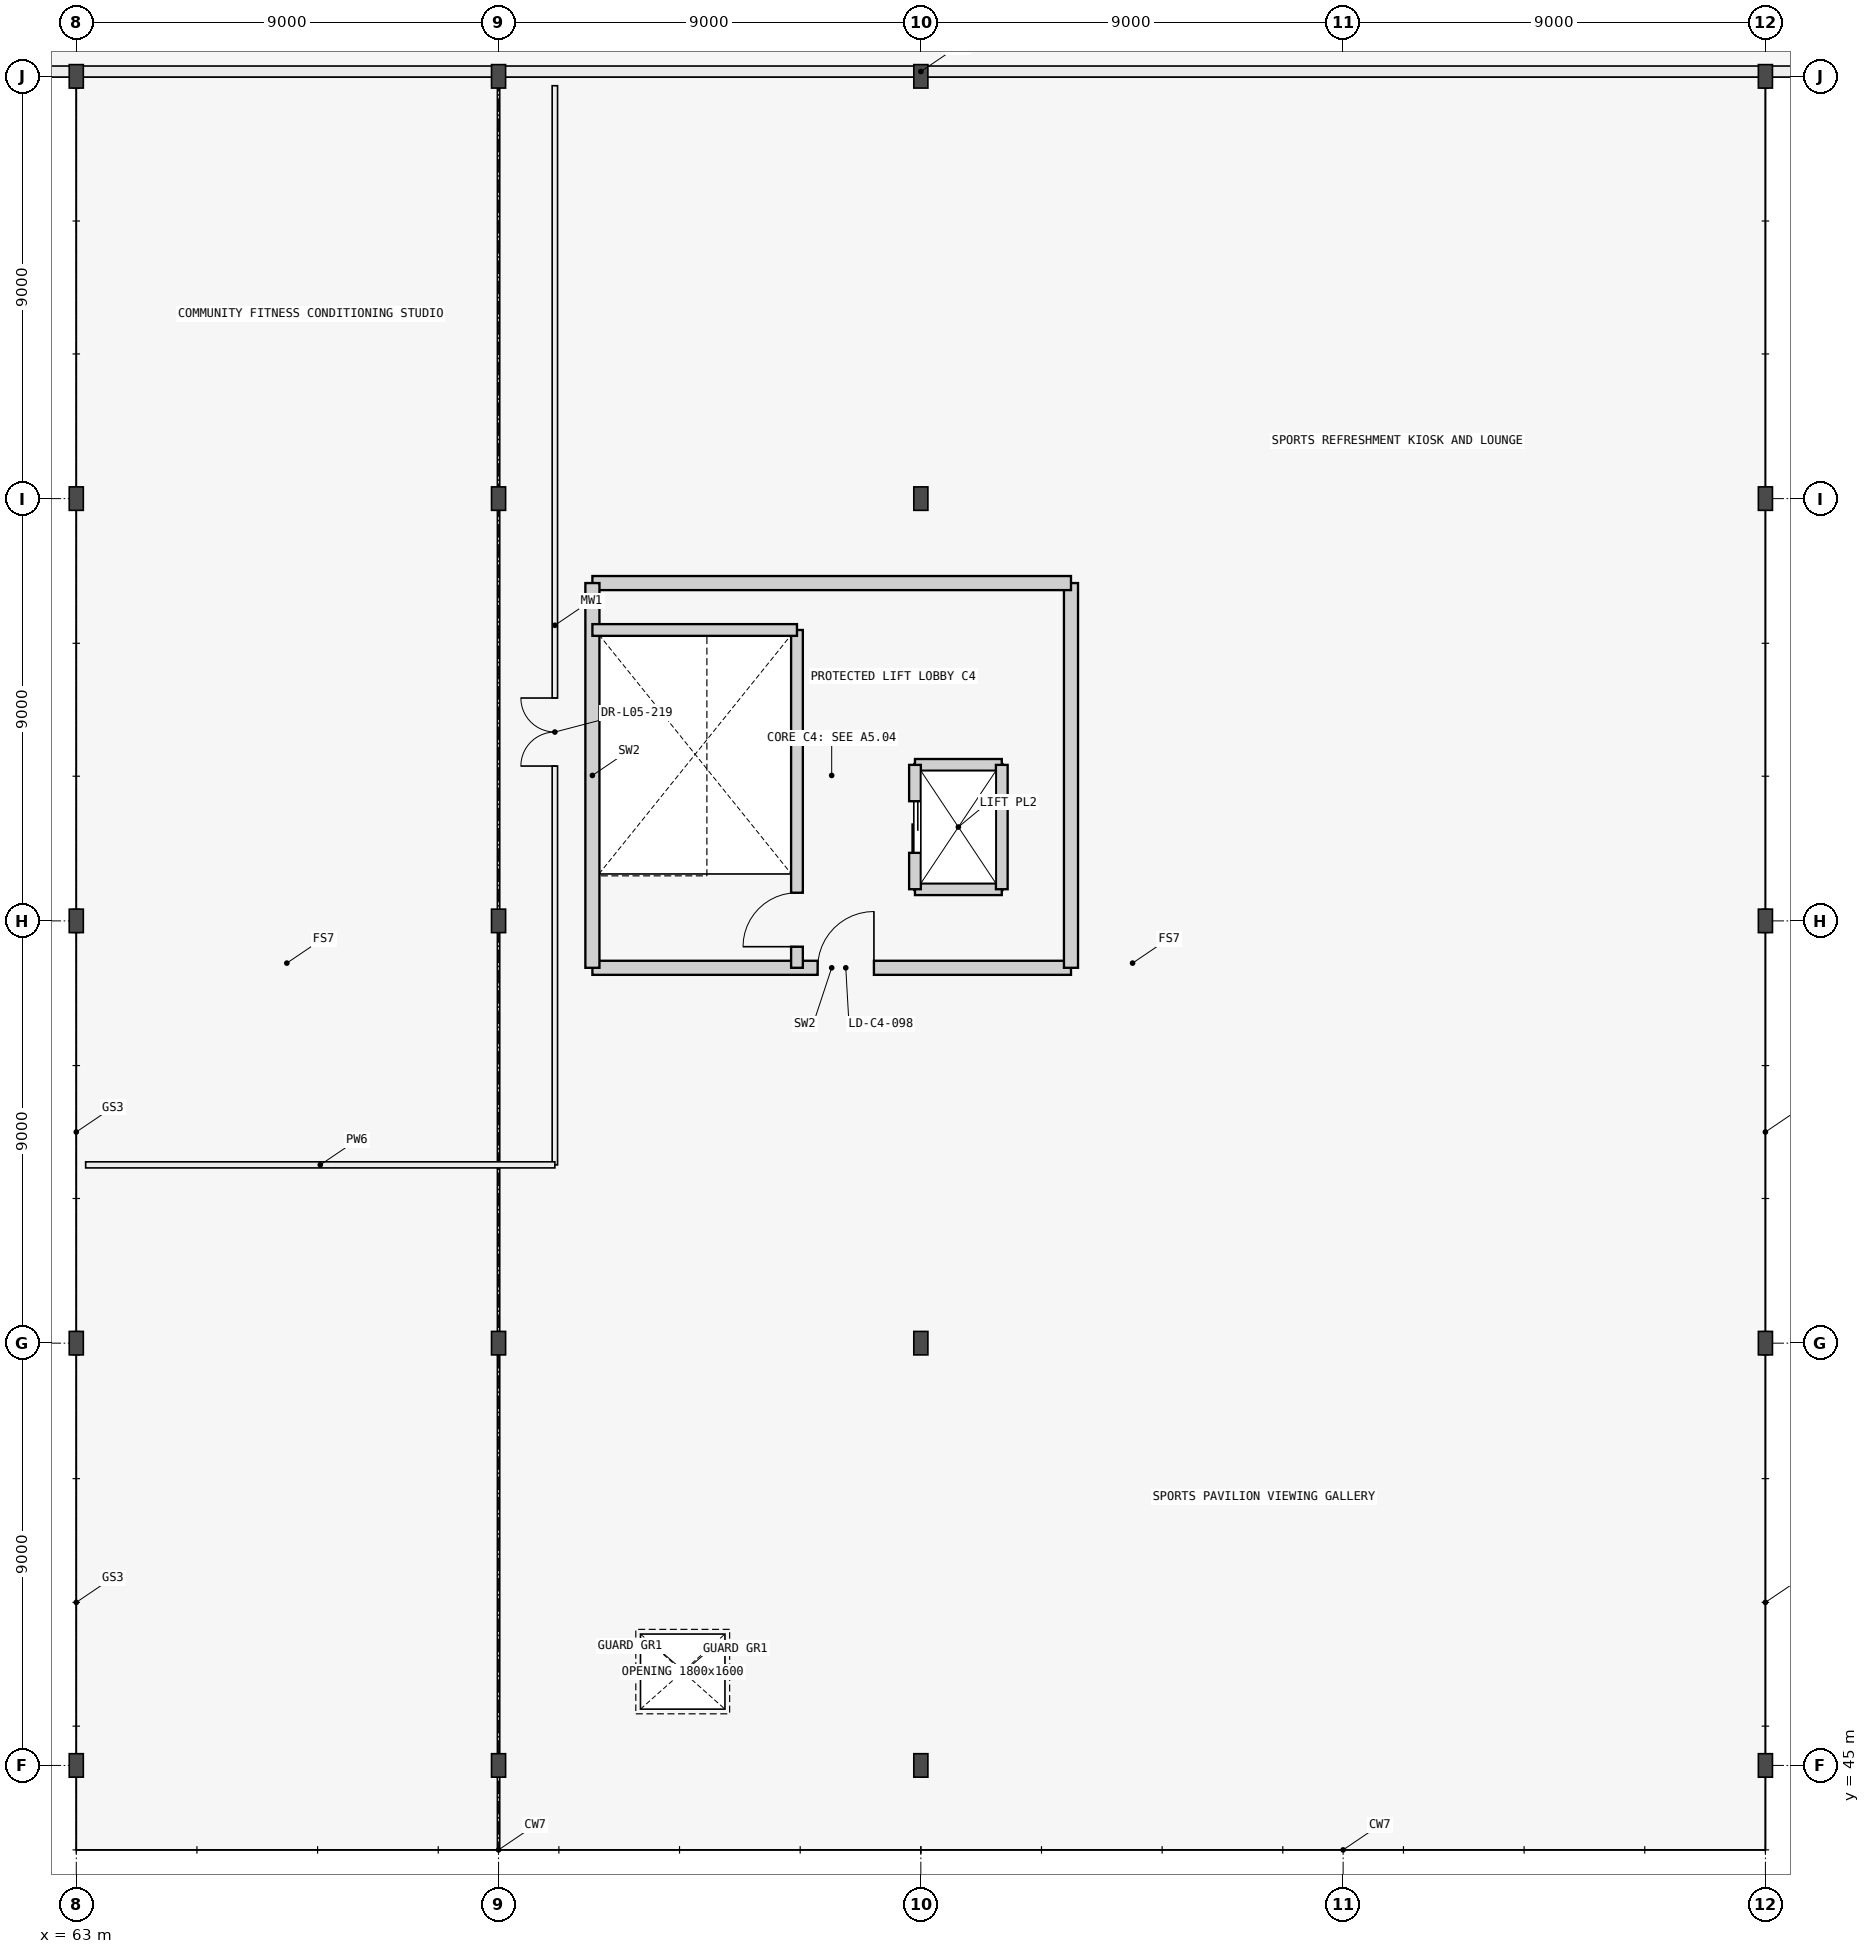
"""IFC4 building model, lengths in metres.
Left out: names, types, materials, properties, quantities, classifications, styles, units other than length and angle.
Written with IfcOpenShell. Run it as: python <this file> out.ifc"""

import sys

from ifc_helpers import new_model, si_unit, direction, frame, frame_2d, origin, origin_2d, place, context, subcontext, project, spatial, rectangle, i_section, extrude, element, fill, save


model = new_model("IFC4")
c1 = context("Model", 3, precision=1e-05, world=origin(), true_north=direction((0.0, 1.0)))
c2 = subcontext(c1, "Body", "Model", "MODEL_VIEW")
j1 = project(units=[si_unit("LENGTHUNIT", "METRE"), si_unit("PLANEANGLEUNIT", "RADIAN")], contexts=[c1])
p1 = place(None, origin())
s1 = spatial("IfcSite", under=j1, at=p1, CompositionType="ELEMENT")
p2 = place(p1, origin())
s2 = spatial("IfcBuilding", under=s1, at=p2, CompositionType="ELEMENT")
p3 = place(p2, frame((0.0, 0.0, 21.0)))
s3 = spatial("IfcBuildingStorey", under=s2, at=p3, CompositionType="ELEMENT", Elevation=21.0)
for number, where, z_axis, x_axis in (
    (1, (72.0, 45.0, 0.0), (0.0, 0.0, 1.0), (1.0, 0.0, 0.0)),
    (2, (72.0, 54.0, 0.0), (0.0, 0.0, 1.0), (1.0, 0.0, 0.0)),
    (3, (72.0, 63.0, 0.0), (0.0, 0.0, 1.0), (1.0, 0.0, 0.0)),
    (4, (72.0, 72.0, 0.0), (0.0, 0.0, 1.0), (1.0, 0.0, 0.0)),
    (5, (72.0, 81.0, 0.0), (0.0, 0.0, 1.0), (1.0, 0.0, 0.0)),
    (6, (81.0, 45.0, 0.0), (0.0, 0.0, 1.0), (1.0, 0.0, 0.0)),
    (7, (81.0, 54.0, 0.0), (0.0, 0.0, 1.0), (1.0, 0.0, 0.0)),
    (8, (81.0, 72.0, 0.0), (0.0, 0.0, 1.0), (1.0, 0.0, 0.0)),
    (9, (81.0, 81.0, 0.0), (0.0, 0.0, 1.0), (1.0, 0.0, 0.0)),
    (10, (99.0, 45.0, 0.0), (0.0, 0.0, 1.0), (1.0, 0.0, 0.0)),
    (11, (99.0, 54.0, 0.0), (0.0, 0.0, 1.0), (1.0, 0.0, 0.0)),
    (12, (99.0, 63.0, 0.0), (0.0, 0.0, 1.0), (1.0, 0.0, 0.0)),
    (13, (99.0, 72.0, 0.0), (0.0, 0.0, 1.0), (1.0, 0.0, 0.0)),
    (14, (99.0, 81.0, 0.0), (0.0, 0.0, 1.0), (1.0, 0.0, 0.0)),
    (15, (63.0, 54.0, 0.0), (0.0, 0.0, 1.0), (1.0, 0.0, 0.0)),
    (16, (63.0, 63.0, 0.0), (0.0, 0.0, 1.0), (1.0, 0.0, 0.0)),
    (17, (63.0, 45.0, 0.0), (0.0, 0.0, 1.0), (1.0, 0.0, 0.0)),
    (18, (63.0, 72.0, 0.0), (0.0, 0.0, 1.0), (1.0, 0.0, 0.0)),
    (19, (63.0, 81.0, 0.0), (0.0, 0.0, 1.0), (1.0, 0.0, 0.0)),
):
    element("IfcColumn", number, at=place(p3, frame(where, z_axis=z_axis, x_axis=x_axis)), inside=s3, PredefinedType="COLUMN", context=c2, shape_type="SweptSolid", body=[
        extrude(i_section(OverallWidth=0.3, OverallDepth=0.5, WebThickness=0.014, FlangeThickness=0.028, FilletRadius=0.027, at=origin_2d()), origin(), (0.0, 0.0, 1.0), 4.2),
    ])
p4 = place(p3, frame((45.0, 81.103, 0.245), z_axis=(0.0, 0.0, 1.0), x_axis=(1.0, 0.0, 0.0)))
e20 = element("IfcWall", 20, at=p4, inside=s3, PredefinedType="PARAPET", context=c2, shape_type="SweptSolid", body=[
    extrude(rectangle(XDim=72.0, YDim=0.235, at=frame_2d((36.0, 0.0))), origin(), (0.0, 0.0, 1.0), 1.25),
])
p5 = place(p3, frame((74.0, 62.0, 0.0), z_axis=(0.0, 0.0, 1.0), x_axis=(1.0, 0.0, 0.0)))
e21 = element("IfcWall", 21, at=p5, inside=s3, PredefinedType="SHEAR", context=c2, shape_type="SweptSolid", body=[
    extrude(rectangle(XDim=10.2, YDim=0.3, at=frame_2d((5.1, 0.0))), origin(), (0.0, 0.0, 1.0), 3.96),
])
p6 = place(p5, frame((4.8, 0.0, 0.0)))
e22 = element("IfcOpeningElement", 22, at=p6, cuts=e21, PredefinedType="OPENING", context=c2, shape_type="SweptSolid", body=[
    extrude(rectangle(XDim=1.2, YDim=2.15, at=frame_2d((0.6, 1.075))), frame((0.0, 0.16, 0.0), z_axis=(0.0, -1.0, 0.0), x_axis=(1.0, 0.0, 0.0)), (0.0, 0.0, 1.0), 0.32),
])
p7 = place(p3, frame((84.2, 62.0, 0.0), z_axis=(0.0, 0.0, 1.0), x_axis=(0.0, 1.0, 0.0)))
e23 = element("IfcWall", 23, at=p7, inside=s3, PredefinedType="SHEAR", context=c2, shape_type="SweptSolid", body=[
    extrude(rectangle(XDim=8.2, YDim=0.3, at=frame_2d((4.1, 0.0))), origin(), (0.0, 0.0, 1.0), 3.96),
])
p8 = place(p3, frame((84.2, 70.2, 0.0), z_axis=(0.0, 0.0, 1.0), x_axis=(-1.0, 0.0, 0.0)))
e24 = element("IfcWall", 24, at=p8, inside=s3, PredefinedType="SHEAR", context=c2, shape_type="SweptSolid", body=[
    extrude(rectangle(XDim=10.2, YDim=0.3, at=frame_2d((5.1, 0.0))), origin(), (0.0, 0.0, 1.0), 3.96),
])
p9 = place(p3, frame((74.0, 70.2, 0.0), z_axis=(0.0, 0.0, 1.0), x_axis=(0.0, -1.0, 0.0)))
e25 = element("IfcWall", 25, at=p9, inside=s3, PredefinedType="SHEAR", context=c2, shape_type="SweptSolid", body=[
    extrude(rectangle(XDim=8.2, YDim=0.3, at=frame_2d((4.1, 0.0))), origin(), (0.0, 0.0, 1.0), 3.96),
])
p10 = place(p3, frame((78.36, 62.0, 0.0), z_axis=(0.0, 0.0, 1.0), x_axis=(0.0, 1.0, 0.0)))
e26 = element("IfcWall", 26, at=p10, inside=s3, PredefinedType="SHEAR", context=c2, shape_type="SweptSolid", body=[
    extrude(rectangle(XDim=7.2, YDim=0.25, at=frame_2d((3.6, 0.0))), origin(), (0.0, 0.0, 1.0), 3.96),
])
p11 = place(p10, frame((0.45, 0.0, 0.0)))
e27 = element("IfcOpeningElement", 27, at=p11, cuts=e26, PredefinedType="OPENING", context=c2, shape_type="SweptSolid", body=[
    extrude(rectangle(XDim=1.15, YDim=2.15, at=frame_2d((0.575, 1.075))), frame((0.0, 0.135, 0.0), z_axis=(0.0, -1.0, 0.0), x_axis=(1.0, 0.0, 0.0)), (0.0, 0.0, 1.0), 0.27),
])
p12 = place(p3, frame((74.0, 69.2, 0.0), z_axis=(0.0, 0.0, 1.0), x_axis=(1.0, 0.0, 0.0)))
e28 = element("IfcWall", 28, at=p12, inside=s3, PredefinedType="SHEAR", context=c2, shape_type="SweptSolid", body=[
    extrude(rectangle(XDim=4.36, YDim=0.25, at=frame_2d((2.18, 0.0))), origin(), (0.0, 0.0, 1.0), 3.96),
])
for number, where, z_axis, x_axis in (
    (29, (80.875, 63.675, 0.0), (0.0, 0.0, 1.0), (1.0, 0.0, 0.0)),
    (30, (80.875, 66.325, 0.0), (0.0, 0.0, 1.0), (1.0, 0.0, 0.0)),
):
    element("IfcWall", number, at=place(p3, frame(where, z_axis=z_axis, x_axis=x_axis)), inside=s3, PredefinedType="SHEAR", context=c2, shape_type="SweptSolid", body=[
        extrude(rectangle(XDim=1.85, YDim=0.25, at=frame_2d((0.925, 0.0))), origin(), (0.0, 0.0, 1.0), 3.96),
    ])
p13 = place(p3, frame((82.725, 63.675, 0.0), z_axis=(0.0, 0.0, 1.0), x_axis=(0.0, 1.0, 0.0)))
e31 = element("IfcWall", 31, at=p13, inside=s3, PredefinedType="SHEAR", context=c2, shape_type="SweptSolid", body=[
    extrude(rectangle(XDim=2.65, YDim=0.25, at=frame_2d((1.325, 0.0))), origin(), (0.0, 0.0, 1.0), 3.96),
])
p14 = place(p3, frame((80.875, 63.675, 0.0), z_axis=(0.0, 0.0, 1.0), x_axis=(0.0, 1.0, 0.0)))
e32 = element("IfcWall", 32, at=p14, inside=s3, PredefinedType="SHEAR", context=c2, shape_type="SweptSolid", body=[
    extrude(rectangle(XDim=2.65, YDim=0.25, at=frame_2d((1.325, 0.0))), origin(), (0.0, 0.0, 1.0), 3.96),
])
p15 = place(p14, frame((0.775, 0.0, 0.0)))
e33 = element("IfcOpeningElement", 33, at=p15, cuts=e32, PredefinedType="OPENING", context=c2, shape_type="SweptSolid", body=[
    extrude(rectangle(XDim=1.1, YDim=2.15, at=frame_2d((0.55, 1.075))), frame((0.0, 0.135, 0.0), z_axis=(0.0, -1.0, 0.0), x_axis=(1.0, 0.0, 0.0)), (0.0, 0.0, 1.0), 0.27),
])
p16 = place(p3, frame((73.2, 57.8, 0.0), z_axis=(0.0, 0.0, 1.0), x_axis=(0.0, 1.0, 0.0)))
e34 = element("IfcWall", 34, at=p16, inside=s3, PredefinedType="MOVABLE", context=c2, shape_type="SweptSolid", body=[
    extrude(rectangle(XDim=23.0, YDim=0.115, at=frame_2d((11.5, 0.0))), origin(), (0.0, 0.0, 1.0), 3.96),
])
p17 = place(p16, frame((8.5, 0.0, 0.0)))
e35 = element("IfcOpeningElement", 35, at=p17, cuts=e34, PredefinedType="OPENING", context=c2, shape_type="SweptSolid", body=[
    extrude(rectangle(XDim=1.45, YDim=2.22, at=frame_2d((0.725, 1.11))), frame((0.0, 0.067, 0.0), z_axis=(0.0, -1.0, 0.0), x_axis=(1.0, 0.0, 0.0)), (0.0, 0.0, 1.0), 0.135),
])
p18 = place(p3, frame((63.2, 57.8, 0.0), z_axis=(0.0, 0.0, 1.0), x_axis=(1.0, 0.0, 0.0)))
e36 = element("IfcWall", 36, at=p18, inside=s3, PredefinedType="PARTITIONING", context=c2, shape_type="SweptSolid", body=[
    extrude(rectangle(XDim=10.0, YDim=0.13, at=frame_2d((5.0, 0.0))), origin(), (0.0, 0.0, 1.0), 3.96),
])
p19 = place(p11, origin())
e37 = element("IfcDoor", 37, at=p19, inside=s3, OperationType="SINGLE_SWING_LEFT", PredefinedType="DOOR", context=c2, shape_type="SweptSolid", body=[
    extrude(rectangle(XDim=1.15, YDim=2.15, at=frame_2d((0.575, 1.075))), frame((0.0, 0.025, 0.0), z_axis=(0.0, -1.0, 0.0), x_axis=(1.0, 0.0, 0.0)), (0.0, 0.0, 1.0), 0.05),
])
fill(e27, e37)
p20 = place(p6, origin())
e38 = element("IfcDoor", 38, at=p20, inside=s3, OperationType="SINGLE_SWING_RIGHT", PredefinedType="DOOR", context=c2, shape_type="SweptSolid", body=[
    extrude(rectangle(XDim=1.2, YDim=2.15, at=frame_2d((0.6, 1.075))), frame((0.0, 0.025, 0.0), z_axis=(0.0, -1.0, 0.0), x_axis=(1.0, 0.0, 0.0)), (0.0, 0.0, 1.0), 0.05),
])
fill(e22, e38)
p21 = place(p15, origin())
e39 = element("IfcDoor", 39, at=p21, inside=s3, OperationType="DOUBLE_DOOR_SLIDING", PredefinedType="USERDEFINED", context=c2, shape_type="SweptSolid", body=[
    extrude(rectangle(XDim=1.1, YDim=2.15, at=frame_2d((0.55, 1.075))), frame((0.0, 0.025, 0.0), z_axis=(0.0, -1.0, 0.0), x_axis=(1.0, 0.0, 0.0)), (0.0, 0.0, 1.0), 0.05),
])
fill(e33, e39)
p22 = place(p17, origin())
e40 = element("IfcDoor", 40, at=p22, inside=s3, OperationType="DOUBLE_DOOR_SINGLE_SWING", PredefinedType="DOOR", context=c2, shape_type="SweptSolid", body=[
    extrude(rectangle(XDim=1.45, YDim=2.22, at=frame_2d((0.725, 1.11))), frame((0.0, 0.025, 0.0), z_axis=(0.0, -1.0, 0.0), x_axis=(1.0, 0.0, 0.0)), (0.0, 0.0, 1.0), 0.05),
])
fill(e35, e40)
save(model, sys.argv[1])
